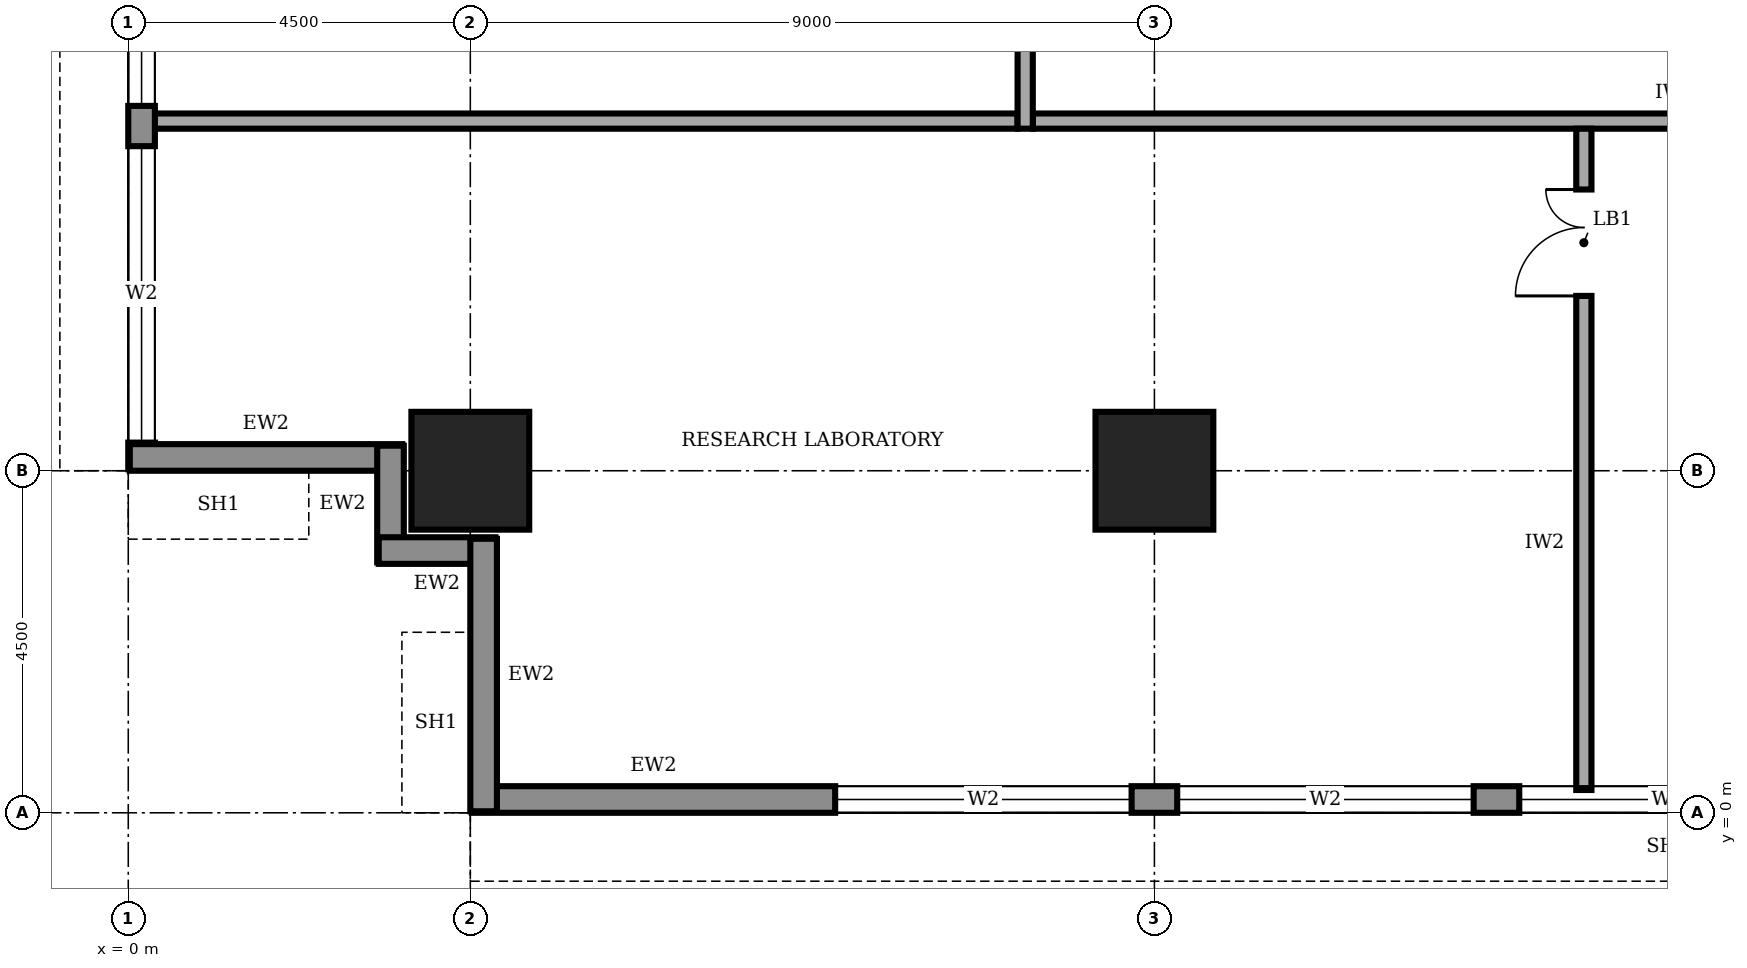
"""IFC4 building model, lengths in metres.
Left out: names, types, materials, properties, quantities, classifications, styles, units other than length and angle.
Written with IfcOpenShell. Run it as: python <this file> out.ifc"""

import sys

from ifc_helpers import new_model, si_unit, direction, frame, frame_2d, origin, origin_2d, place, context, subcontext, project, spatial, rectangle, extrude, element, fill, save


model = new_model("IFC4")
c1 = context("Model", 3, precision=1e-05, world=origin(), true_north=direction((0.0, 1.0)))
c2 = subcontext(c1, "Body", "Model", "MODEL_VIEW")
j1 = project(units=[si_unit("LENGTHUNIT", "METRE"), si_unit("PLANEANGLEUNIT", "RADIAN")], contexts=[c1])
p1 = place(None, origin())
s1 = spatial("IfcSite", under=j1, at=p1, CompositionType="ELEMENT")
p2 = place(p1, origin())
s2 = spatial("IfcBuilding", under=s1, at=p2, CompositionType="ELEMENT")
p3 = place(p2, frame((0.0, 0.0, 229.0)))
s3 = spatial("IfcBuildingStorey", under=s2, at=p3, CompositionType="ELEMENT", Elevation=229.0)
for number, where, z_axis, x_axis in (
    (1, (4.5, 4.5, 0.0), (0.0, 0.0, 1.0), (1.0, 0.0, 0.0)),
    (2, (13.5, 4.5, 0.0), (0.0, 0.0, 1.0), (1.0, 0.0, 0.0)),
):
    element("IfcColumn", number, at=place(p3, frame(where, z_axis=z_axis, x_axis=x_axis)), inside=s3, PredefinedType="COLUMN", context=c2, shape_type="SweptSolid", body=[
        extrude(rectangle(XDim=1.55, YDim=1.55, at=origin_2d()), origin(), (0.0, 0.0, 1.0), 4.0),
    ])
p4 = place(p3, frame((4.52, 0.175, 0.0), z_axis=(0.0, 0.0, 1.0), x_axis=(1.0, 0.0, 0.0)))
e3 = element("IfcWall", 3, at=p4, inside=s3, PredefinedType="STANDARD", context=c2, shape_type="SweptSolid", body=[
    extrude(rectangle(XDim=31.46, YDim=0.35, at=frame_2d((15.73, 0.0))), origin(), (0.0, 0.0, 1.0), 3.75),
])
p5 = place(p4, frame((4.78, 0.0, 0.6)))
e4 = element("IfcOpeningElement", 4, at=p5, cuts=e3, PredefinedType="OPENING", context=c2, shape_type="SweptSolid", body=[
    extrude(rectangle(XDim=3.9, YDim=2.6, at=frame_2d((1.95, 1.3))), frame((0.0, 0.185, 0.0), z_axis=(0.0, -1.0, 0.0), x_axis=(1.0, 0.0, 0.0)), (0.0, 0.0, 1.0), 0.37),
])
p6 = place(p4, frame((9.28, 0.0, 0.6)))
e5 = element("IfcOpeningElement", 5, at=p6, cuts=e3, PredefinedType="OPENING", context=c2, shape_type="SweptSolid", body=[
    extrude(rectangle(XDim=3.9, YDim=2.6, at=frame_2d((1.95, 1.3))), frame((0.0, 0.185, 0.0), z_axis=(0.0, -1.0, 0.0), x_axis=(1.0, 0.0, 0.0)), (0.0, 0.0, 1.0), 0.37),
])
p7 = place(p4, frame((13.78, 0.0, 0.6)))
e6 = element("IfcOpeningElement", 6, at=p7, cuts=e3, PredefinedType="OPENING", context=c2, shape_type="SweptSolid", body=[
    extrude(rectangle(XDim=3.9, YDim=2.6, at=frame_2d((1.95, 1.3))), frame((0.0, 0.185, 0.0), z_axis=(0.0, -1.0, 0.0), x_axis=(1.0, 0.0, 0.0)), (0.0, 0.0, 1.0), 0.37),
])
p8 = place(p4, frame((18.28, 0.0, 0.6)))
e7 = element("IfcOpeningElement", 7, at=p8, cuts=e3, PredefinedType="OPENING", context=c2, shape_type="SweptSolid", body=[
    extrude(rectangle(XDim=3.9, YDim=2.6, at=frame_2d((1.95, 1.3))), frame((0.0, 0.185, 0.0), z_axis=(0.0, -1.0, 0.0), x_axis=(1.0, 0.0, 0.0)), (0.0, 0.0, 1.0), 0.37),
])
p9 = place(p4, frame((22.78, 0.0, 0.6)))
e8 = element("IfcOpeningElement", 8, at=p9, cuts=e3, PredefinedType="OPENING", context=c2, shape_type="SweptSolid", body=[
    extrude(rectangle(XDim=3.9, YDim=2.6, at=frame_2d((1.95, 1.3))), frame((0.0, 0.185, 0.0), z_axis=(0.0, -1.0, 0.0), x_axis=(1.0, 0.0, 0.0)), (0.0, 0.0, 1.0), 0.37),
])
p10 = place(p4, frame((27.21, 0.0, 0.6)))
e9 = element("IfcOpeningElement", 9, at=p10, cuts=e3, PredefinedType="OPENING", context=c2, shape_type="SweptSolid", body=[
    extrude(rectangle(XDim=3.9, YDim=2.6, at=frame_2d((1.95, 1.3))), frame((0.0, 0.185, 0.0), z_axis=(0.0, -1.0, 0.0), x_axis=(1.0, 0.0, 0.0)), (0.0, 0.0, 1.0), 0.37),
])
p11 = place(p3, frame((0.175, 35.98, 0.0), z_axis=(0.0, 0.0, 1.0), x_axis=(0.0, -1.0, 0.0)))
e10 = element("IfcWall", 10, at=p11, inside=s3, PredefinedType="STANDARD", context=c2, shape_type="SweptSolid", body=[
    extrude(rectangle(XDim=31.46, YDim=0.35, at=frame_2d((15.73, 0.0))), origin(), (0.0, 0.0, 1.0), 3.75),
])
p12 = place(p11, frame((27.21, 0.0, 0.6)))
e11 = element("IfcOpeningElement", 11, at=p12, cuts=e10, PredefinedType="OPENING", context=c2, shape_type="SweptSolid", body=[
    extrude(rectangle(XDim=3.9, YDim=2.6, at=frame_2d((1.95, 1.3))), frame((0.0, 0.185, 0.0), z_axis=(0.0, -1.0, 0.0), x_axis=(1.0, 0.0, 0.0)), (0.0, 0.0, 1.0), 0.37),
])
p13 = place(p11, frame((22.78, 0.0, 0.6)))
e12 = element("IfcOpeningElement", 12, at=p13, cuts=e10, PredefinedType="OPENING", context=c2, shape_type="SweptSolid", body=[
    extrude(rectangle(XDim=3.9, YDim=2.6, at=frame_2d((1.95, 1.3))), frame((0.0, 0.185, 0.0), z_axis=(0.0, -1.0, 0.0), x_axis=(1.0, 0.0, 0.0)), (0.0, 0.0, 1.0), 0.37),
])
p14 = place(p11, frame((18.28, 0.0, 0.6)))
e13 = element("IfcOpeningElement", 13, at=p14, cuts=e10, PredefinedType="OPENING", context=c2, shape_type="SweptSolid", body=[
    extrude(rectangle(XDim=3.9, YDim=2.6, at=frame_2d((1.95, 1.3))), frame((0.0, 0.185, 0.0), z_axis=(0.0, -1.0, 0.0), x_axis=(1.0, 0.0, 0.0)), (0.0, 0.0, 1.0), 0.37),
])
p15 = place(p11, frame((13.78, 0.0, 0.6)))
e14 = element("IfcOpeningElement", 14, at=p15, cuts=e10, PredefinedType="OPENING", context=c2, shape_type="SweptSolid", body=[
    extrude(rectangle(XDim=3.9, YDim=2.6, at=frame_2d((1.95, 1.3))), frame((0.0, 0.185, 0.0), z_axis=(0.0, -1.0, 0.0), x_axis=(1.0, 0.0, 0.0)), (0.0, 0.0, 1.0), 0.37),
])
p16 = place(p11, frame((9.28, 0.0, 0.6)))
e15 = element("IfcOpeningElement", 15, at=p16, cuts=e10, PredefinedType="OPENING", context=c2, shape_type="SweptSolid", body=[
    extrude(rectangle(XDim=3.9, YDim=2.6, at=frame_2d((1.95, 1.3))), frame((0.0, 0.185, 0.0), z_axis=(0.0, -1.0, 0.0), x_axis=(1.0, 0.0, 0.0)), (0.0, 0.0, 1.0), 0.37),
])
p17 = place(p11, frame((4.78, 0.0, 0.6)))
e16 = element("IfcOpeningElement", 16, at=p17, cuts=e10, PredefinedType="OPENING", context=c2, shape_type="SweptSolid", body=[
    extrude(rectangle(XDim=3.9, YDim=2.6, at=frame_2d((1.95, 1.3))), frame((0.0, 0.185, 0.0), z_axis=(0.0, -1.0, 0.0), x_axis=(1.0, 0.0, 0.0)), (0.0, 0.0, 1.0), 0.37),
])
p18 = place(p3, frame((0.02, 4.675, 0.0), z_axis=(0.0, 0.0, 1.0), x_axis=(1.0, 0.0, 0.0)))
e17 = element("IfcWall", 17, at=p18, inside=s3, PredefinedType="STANDARD", context=c2, shape_type="SweptSolid", body=[
    extrude(rectangle(XDim=3.585, YDim=0.35, at=frame_2d((1.792, 0.0))), origin(), (0.0, 0.0, 1.0), 2.85),
])
for number, where, z_axis, x_axis in (
    (18, (3.45, 4.83, 0.0), (0.0, 0.0, 1.0), (0.0, -1.0, 0.0)),
    (19, (3.295, 3.45, 0.0), (0.0, 0.0, 1.0), (1.0, 0.0, 0.0)),
):
    element("IfcWall", number, at=place(p3, frame(where, z_axis=z_axis, x_axis=x_axis)), inside=s3, PredefinedType="STANDARD", context=c2, shape_type="SweptSolid", body=[
        extrude(rectangle(XDim=1.535, YDim=0.35, at=frame_2d((0.768, 0.0))), origin(), (0.0, 0.0, 1.0), 3.75),
    ])
p19 = place(p3, frame((4.675, 3.605, 0.0), z_axis=(0.0, 0.0, 1.0), x_axis=(0.0, -1.0, 0.0)))
e20 = element("IfcWall", 20, at=p19, inside=s3, PredefinedType="STANDARD", context=c2, shape_type="SweptSolid", body=[
    extrude(rectangle(XDim=3.585, YDim=0.35, at=frame_2d((1.792, 0.0))), origin(), (0.0, 0.0, 1.0), 2.85),
])
p20 = place(p3, frame((11.9, 9.1, 0.0), z_axis=(0.0, 0.0, 1.0), x_axis=(1.0, 0.0, 0.0)))
e21 = element("IfcWall", 21, at=p20, inside=s3, PredefinedType="SOLIDWALL", context=c2, shape_type="SweptSolid", body=[
    extrude(rectangle(XDim=16.9, YDim=0.2, at=frame_2d((8.45, 0.0))), origin(), (0.0, 0.0, 1.0), 3.75),
])
p21 = place(p3, frame((11.8, 32.05, 0.0), z_axis=(0.0, 0.0, 1.0), x_axis=(0.0, -1.0, 0.0)))
e22 = element("IfcWall", 22, at=p21, inside=s3, PredefinedType="SOLIDWALL", context=c2, shape_type="SweptSolid", body=[
    extrude(rectangle(XDim=23.05, YDim=0.2, at=frame_2d((11.525, 0.0))), origin(), (0.0, 0.0, 1.0), 3.75),
])
p22 = place(p21, frame((20.3, 0.0, 0.0)))
e23 = element("IfcOpeningElement", 23, at=p22, cuts=e22, PredefinedType="OPENING", context=c2, shape_type="SweptSolid", body=[
    extrude(rectangle(XDim=1.0, YDim=2.1, at=frame_2d((0.5, 1.05))), frame((0.0, 0.11, 0.0), z_axis=(0.0, -1.0, 0.0), x_axis=(1.0, 0.0, 0.0)), (0.0, 0.0, 1.0), 0.22),
])
p23 = place(p21, frame((16.95, 0.0, 0.0)))
e24 = element("IfcOpeningElement", 24, at=p23, cuts=e22, PredefinedType="OPENING", context=c2, shape_type="SweptSolid", body=[
    extrude(rectangle(XDim=1.0, YDim=2.1, at=frame_2d((0.5, 1.05))), frame((0.0, 0.11, 0.0), z_axis=(0.0, -1.0, 0.0), x_axis=(1.0, 0.0, 0.0)), (0.0, 0.0, 1.0), 0.22),
])
p24 = place(p21, frame((13.95, 0.0, 0.0)))
e25 = element("IfcOpeningElement", 25, at=p24, cuts=e22, PredefinedType="OPENING", context=c2, shape_type="SweptSolid", body=[
    extrude(rectangle(XDim=0.9, YDim=2.1, at=frame_2d((0.45, 1.05))), frame((0.0, 0.11, 0.0), z_axis=(0.0, -1.0, 0.0), x_axis=(1.0, 0.0, 0.0)), (0.0, 0.0, 1.0), 0.22),
])
p25 = place(p21, frame((10.9, 0.0, 0.0)))
e26 = element("IfcOpeningElement", 26, at=p25, cuts=e22, PredefinedType="OPENING", context=c2, shape_type="SweptSolid", body=[
    extrude(rectangle(XDim=0.9, YDim=2.1, at=frame_2d((0.45, 1.05))), frame((0.0, 0.11, 0.0), z_axis=(0.0, -1.0, 0.0), x_axis=(1.0, 0.0, 0.0)), (0.0, 0.0, 1.0), 0.22),
])
p26 = place(p21, frame((6.2, 0.0, 0.0)))
e27 = element("IfcOpeningElement", 27, at=p26, cuts=e22, PredefinedType="OPENING", context=c2, shape_type="SweptSolid", body=[
    extrude(rectangle(XDim=0.9, YDim=2.1, at=frame_2d((0.45, 1.05))), frame((0.0, 0.11, 0.0), z_axis=(0.0, -1.0, 0.0), x_axis=(1.0, 0.0, 0.0)), (0.0, 0.0, 1.0), 0.22),
])
p27 = place(p21, frame((8.75, 0.0, 0.0)))
e28 = element("IfcOpeningElement", 28, at=p27, cuts=e22, PredefinedType="OPENING", context=c2, shape_type="SweptSolid", body=[
    extrude(rectangle(XDim=1.0, YDim=2.1, at=frame_2d((0.5, 1.05))), frame((0.0, 0.11, 0.0), z_axis=(0.0, -1.0, 0.0), x_axis=(1.0, 0.0, 0.0)), (0.0, 0.0, 1.0), 0.22),
])
p28 = place(p21, frame((1.925, 0.0, 0.0)))
e29 = element("IfcOpeningElement", 29, at=p28, cuts=e22, PredefinedType="OPENING", context=c2, shape_type="SweptSolid", body=[
    extrude(rectangle(XDim=1.0, YDim=2.1, at=frame_2d((0.5, 1.05))), frame((0.0, 0.11, 0.0), z_axis=(0.0, -1.0, 0.0), x_axis=(1.0, 0.0, 0.0)), (0.0, 0.0, 1.0), 0.22),
])
p29 = place(p3, frame((19.15, 0.3, 0.0), z_axis=(0.0, 0.0, 1.0), x_axis=(0.0, 1.0, 0.0)))
e30 = element("IfcWall", 30, at=p29, inside=s3, PredefinedType="SOLIDWALL", context=c2, shape_type="SweptSolid", body=[
    extrude(rectangle(XDim=8.7, YDim=0.2, at=frame_2d((4.35, 0.0))), origin(), (0.0, 0.0, 1.0), 3.75),
])
p30 = place(p29, frame((6.5, 0.0, 0.0)))
e31 = element("IfcOpeningElement", 31, at=p30, cuts=e30, PredefinedType="OPENING", context=c2, shape_type="SweptSolid", body=[
    extrude(rectangle(XDim=1.4, YDim=2.1, at=frame_2d((0.7, 1.05))), frame((0.0, 0.11, 0.0), z_axis=(0.0, -1.0, 0.0), x_axis=(1.0, 0.0, 0.0)), (0.0, 0.0, 1.0), 0.22),
])
p31 = place(p3, frame((0.3, 9.1, 0.0), z_axis=(0.0, 0.0, 1.0), x_axis=(1.0, 0.0, 0.0)))
e32 = element("IfcWall", 32, at=p31, inside=s3, PredefinedType="SOLIDWALL", context=c2, shape_type="SweptSolid", body=[
    extrude(rectangle(XDim=11.4, YDim=0.2, at=frame_2d((5.7, 0.0))), origin(), (0.0, 0.0, 1.0), 3.75),
])
p32 = place(p5, origin())
e33 = element("IfcWindow", 33, at=p32, inside=s3, PartitioningType="SINGLE_PANEL", PredefinedType="WINDOW", context=c2, shape_type="SweptSolid", body=[
    extrude(rectangle(XDim=3.9, YDim=2.6, at=frame_2d((1.95, 1.3))), frame((0.0, 0.03, 0.0), z_axis=(0.0, -1.0, 0.0), x_axis=(1.0, 0.0, 0.0)), (0.0, 0.0, 1.0), 0.06),
])
fill(e4, e33)
p33 = place(p6, origin())
e34 = element("IfcWindow", 34, at=p33, inside=s3, PartitioningType="SINGLE_PANEL", PredefinedType="WINDOW", context=c2, shape_type="SweptSolid", body=[
    extrude(rectangle(XDim=3.9, YDim=2.6, at=frame_2d((1.95, 1.3))), frame((0.0, 0.03, 0.0), z_axis=(0.0, -1.0, 0.0), x_axis=(1.0, 0.0, 0.0)), (0.0, 0.0, 1.0), 0.06),
])
fill(e5, e34)
p34 = place(p7, origin())
e35 = element("IfcWindow", 35, at=p34, inside=s3, PartitioningType="SINGLE_PANEL", PredefinedType="WINDOW", context=c2, shape_type="SweptSolid", body=[
    extrude(rectangle(XDim=3.9, YDim=2.6, at=frame_2d((1.95, 1.3))), frame((0.0, 0.03, 0.0), z_axis=(0.0, -1.0, 0.0), x_axis=(1.0, 0.0, 0.0)), (0.0, 0.0, 1.0), 0.06),
])
fill(e6, e35)
p35 = place(p12, origin())
e36 = element("IfcWindow", 36, at=p35, inside=s3, PartitioningType="SINGLE_PANEL", PredefinedType="WINDOW", context=c2, shape_type="SweptSolid", body=[
    extrude(rectangle(XDim=3.9, YDim=2.6, at=frame_2d((1.95, 1.3))), frame((0.0, 0.03, 0.0), z_axis=(0.0, -1.0, 0.0), x_axis=(1.0, 0.0, 0.0)), (0.0, 0.0, 1.0), 0.06),
])
fill(e11, e36)
p36 = place(p13, origin())
e37 = element("IfcWindow", 37, at=p36, inside=s3, PartitioningType="SINGLE_PANEL", PredefinedType="WINDOW", context=c2, shape_type="SweptSolid", body=[
    extrude(rectangle(XDim=3.9, YDim=2.6, at=frame_2d((1.95, 1.3))), frame((0.0, 0.03, 0.0), z_axis=(0.0, -1.0, 0.0), x_axis=(1.0, 0.0, 0.0)), (0.0, 0.0, 1.0), 0.06),
])
fill(e12, e37)
p37 = place(p30, origin())
e38 = element("IfcDoor", 38, at=p37, inside=s3, OperationType="DOUBLE_DOOR_SINGLE_SWING", PredefinedType="DOOR", context=c2, shape_type="SweptSolid", body=[
    extrude(rectangle(XDim=1.4, YDim=2.1, at=frame_2d((0.7, 1.05))), frame((0.0, 0.025, 0.0), z_axis=(0.0, -1.0, 0.0), x_axis=(1.0, 0.0, 0.0)), (0.0, 0.0, 1.0), 0.05),
])
fill(e31, e38)
save(model, sys.argv[1])
